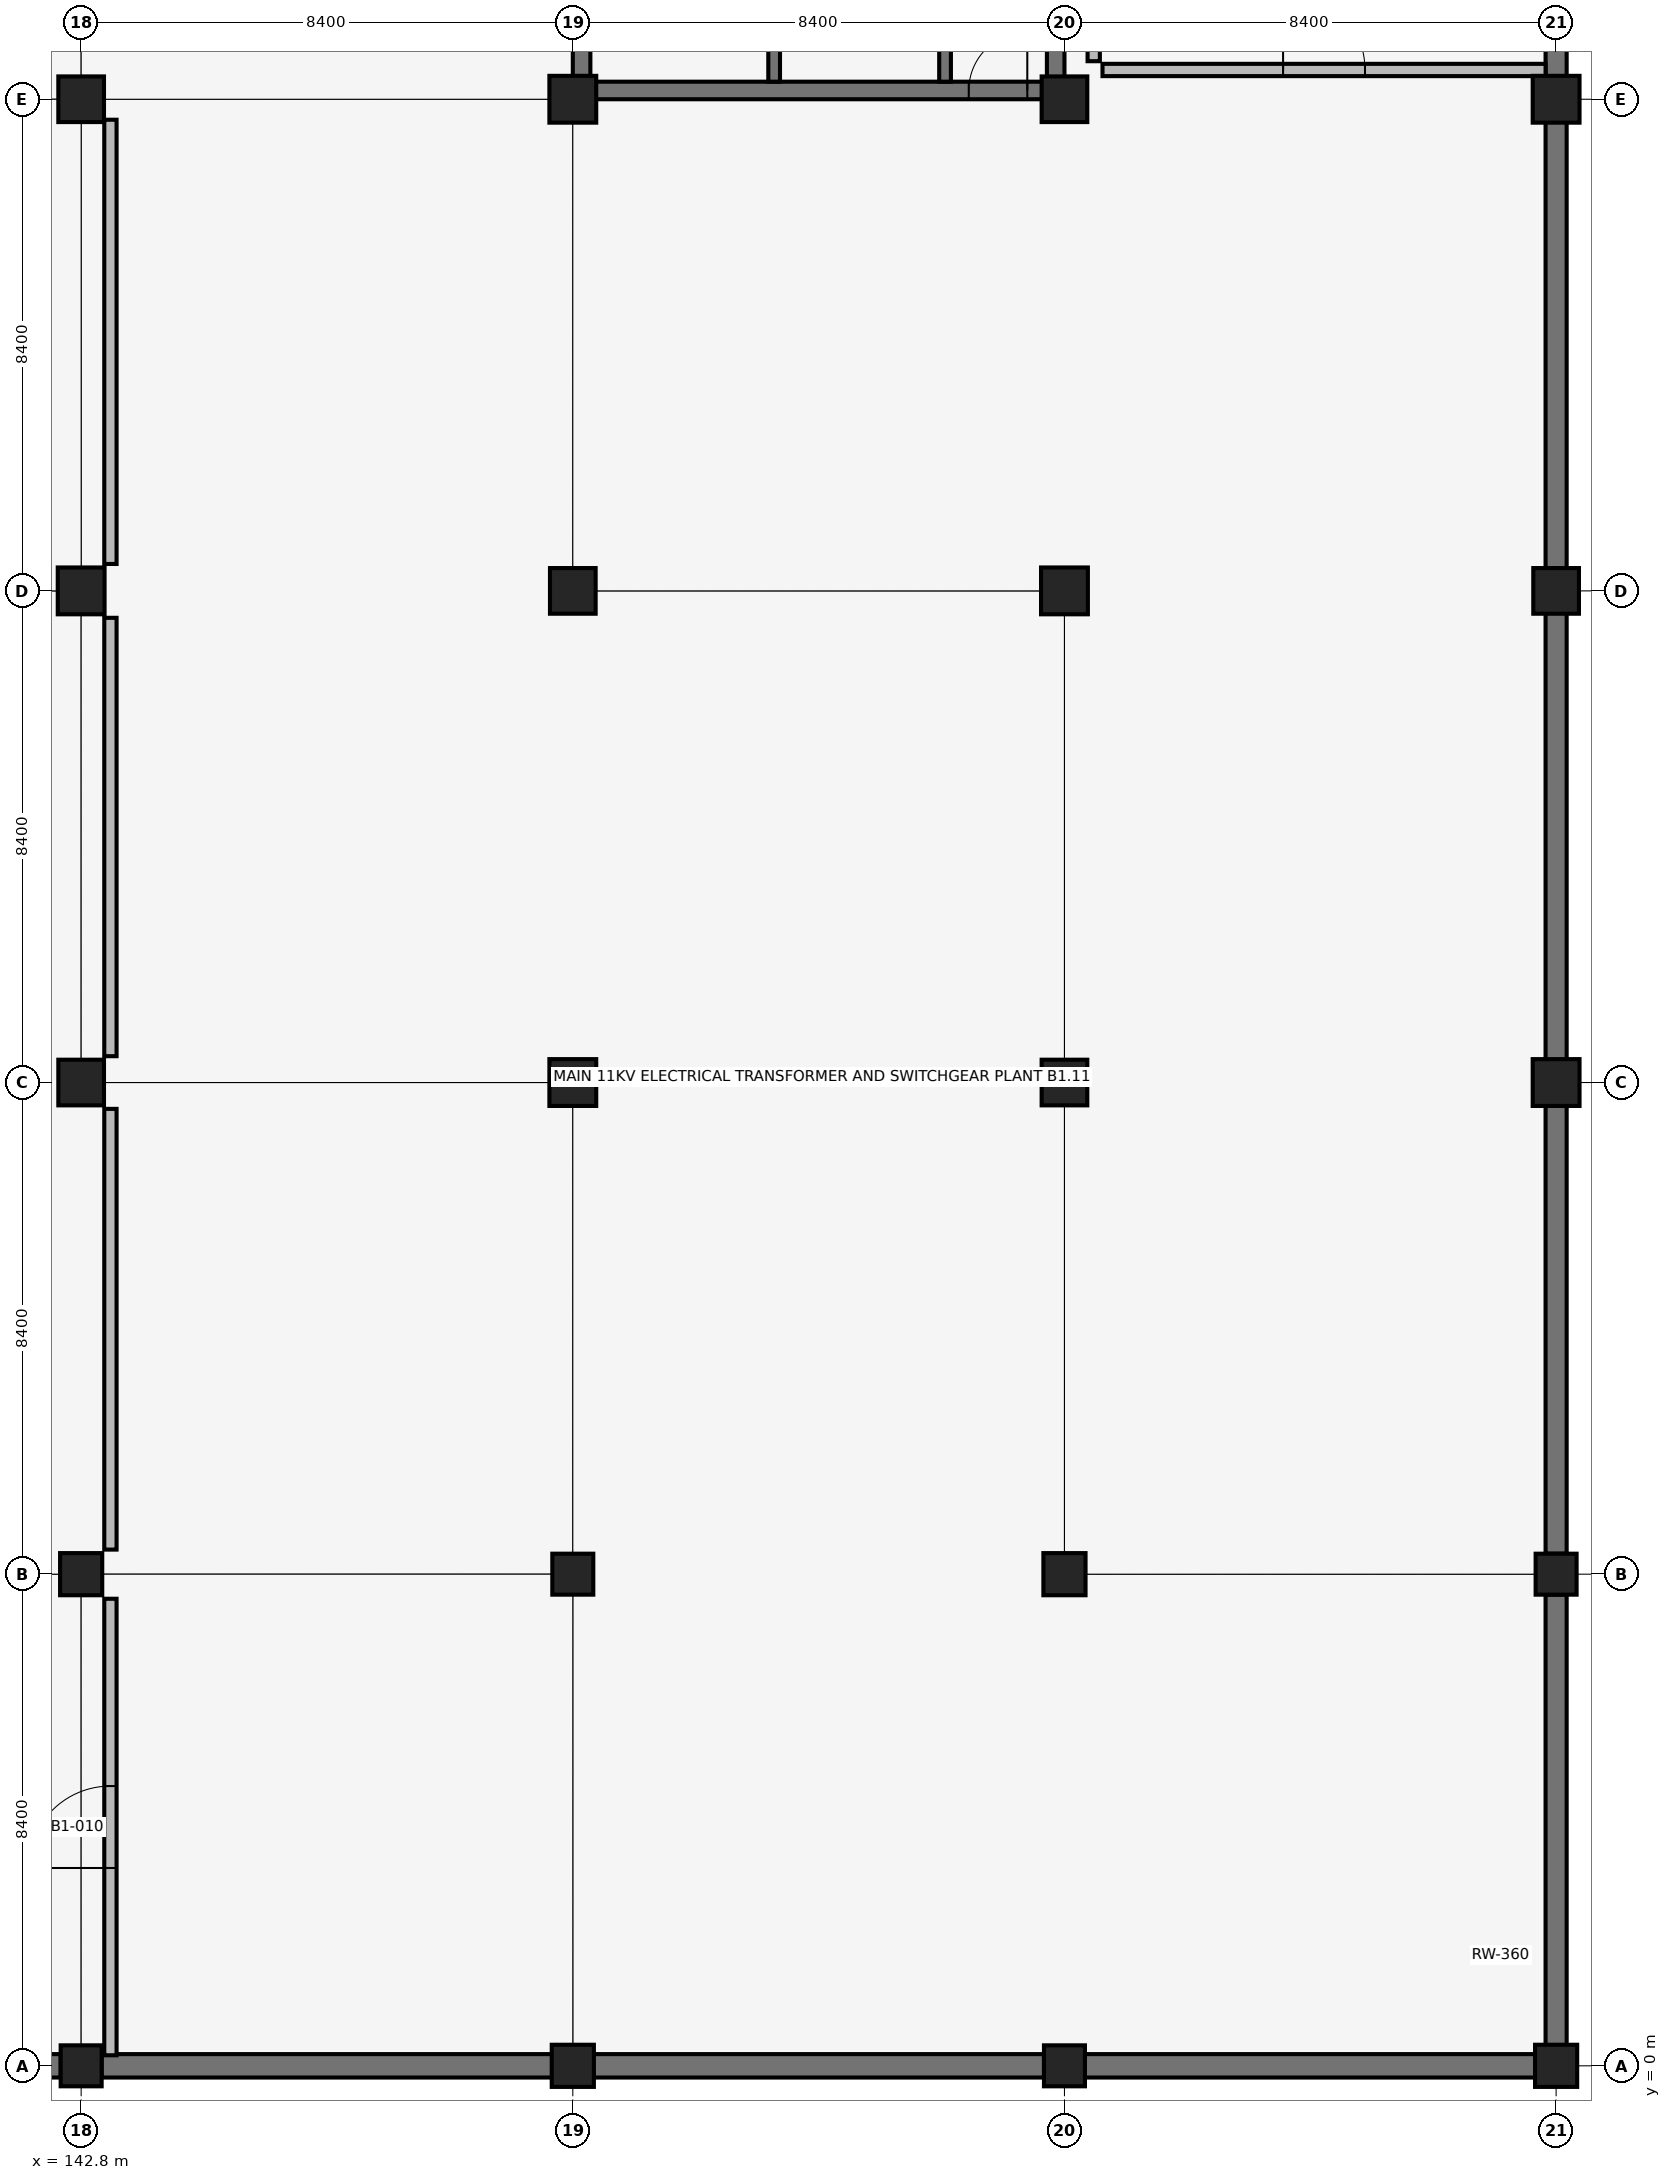
"""IFC4 building model, lengths in metres.
Left out: names, types, materials, properties, quantities, classifications, styles, units other than length and angle.
Written with IfcOpenShell. Run it as: python <this file> out.ifc"""

import sys

from ifc_helpers import new_model, si_unit, direction, frame, frame_2d, origin, origin_2d, place, context, subcontext, project, spatial, rectangle, extrude, element, fill, save


model = new_model("IFC4")
c1 = context("Model", 3, precision=1e-05, world=origin(), true_north=direction((0.0, 1.0)))
c2 = subcontext(c1, "Body", "Model", "MODEL_VIEW")
j1 = project(units=[si_unit("LENGTHUNIT", "METRE"), si_unit("PLANEANGLEUNIT", "RADIAN")], contexts=[c1])
p1 = place(None, origin())
s1 = spatial("IfcSite", under=j1, at=p1, CompositionType="ELEMENT")
p2 = place(p1, origin())
s2 = spatial("IfcBuilding", under=s1, at=p2, CompositionType="ELEMENT")
p3 = place(p2, frame((0.0, 0.0, -4.42)))
s3 = spatial("IfcBuildingStorey", under=s2, at=p3, CompositionType="ELEMENT", Elevation=-4.42)
p4 = place(p3, frame((134.75, 0.0, 0.0), z_axis=(0.0, 0.0, 1.0), x_axis=(1.0, 0.0, 0.0)))
e1 = element("IfcWall", 1, at=p4, inside=s3, PredefinedType="USERDEFINED", context=c2, shape_type="SweptSolid", body=[
    extrude(rectangle(XDim=7.7, YDim=0.4, at=frame_2d((3.85, 0.0))), origin(), (0.0, 0.0, 1.0), 4.12),
])
p5 = place(p3, frame((143.15, 0.0, 0.0), z_axis=(0.0, 0.0, 1.0), x_axis=(1.0, 0.0, 0.0)))
e2 = element("IfcWall", 2, at=p5, inside=s3, PredefinedType="USERDEFINED", context=c2, shape_type="SweptSolid", body=[
    extrude(rectangle(XDim=7.7, YDim=0.4, at=frame_2d((3.85, 0.0))), origin(), (0.0, 0.0, 1.0), 4.12),
])
for number, where, z_axis, x_axis in (
    (3, (151.55, 0.0, 0.0), (0.0, 0.0, 1.0), (1.0, 0.0, 0.0)),
    (4, (159.95, 0.0, 0.0), (0.0, 0.0, 1.0), (1.0, 0.0, 0.0)),
):
    element("IfcWall", number, at=place(p3, frame(where, z_axis=z_axis, x_axis=x_axis)), inside=s3, PredefinedType="USERDEFINED", context=c2, shape_type="SweptSolid", body=[
        extrude(rectangle(XDim=7.7, YDim=0.4, at=frame_2d((3.85, 0.0))), origin(), (0.0, 0.0, 1.0), 4.12),
    ])
for number, where, z_axis, x_axis in (
    (5, (168.0, 0.35, 0.0), (0.0, 0.0, 1.0), (0.0, 1.0, 0.0)),
    (6, (168.0, 8.75, 0.0), (0.0, 0.0, 1.0), (0.0, 1.0, 0.0)),
):
    element("IfcWall", number, at=place(p3, frame(where, z_axis=z_axis, x_axis=x_axis)), inside=s3, PredefinedType="USERDEFINED", context=c2, shape_type="SweptSolid", body=[
        extrude(rectangle(XDim=7.7, YDim=0.36, at=frame_2d((3.85, 0.0))), origin(), (0.0, 0.0, 1.0), 4.12),
    ])
p6 = place(p3, frame((168.0, 17.15, 0.0), z_axis=(0.0, 0.0, 1.0), x_axis=(0.0, 1.0, 0.0)))
e7 = element("IfcWall", 7, at=p6, inside=s3, PredefinedType="USERDEFINED", context=c2, shape_type="SweptSolid", body=[
    extrude(rectangle(XDim=7.7, YDim=0.36, at=frame_2d((3.85, 0.0))), origin(), (0.0, 0.0, 1.0), 4.12),
])
for number, where, z_axis, x_axis in (
    (8, (168.0, 25.55, 0.0), (0.0, 0.0, 1.0), (0.0, 1.0, 0.0)),
    (9, (168.0, 33.95, 0.0), (0.0, 0.0, 1.0), (0.0, 1.0, 0.0)),
):
    element("IfcWall", number, at=place(p3, frame(where, z_axis=z_axis, x_axis=x_axis)), inside=s3, PredefinedType="USERDEFINED", context=c2, shape_type="SweptSolid", body=[
        extrude(rectangle(XDim=7.7, YDim=0.36, at=frame_2d((3.85, 0.0))), origin(), (0.0, 0.0, 1.0), 4.12),
    ])
p7 = place(p3, frame((151.35, 33.75, 0.0), z_axis=(0.0, 0.0, 1.0), x_axis=(1.0, 0.0, 0.0)))
e10 = element("IfcWall", 10, at=p7, inside=s3, PredefinedType="SHEAR", context=c2, shape_type="SweptSolid", body=[
    extrude(rectangle(XDim=8.1, YDim=0.3, at=frame_2d((4.05, 0.0))), origin(), (0.0, 0.0, 1.0), 4.12),
])
p8 = place(p7, frame((6.615, 0.0, 0.0)))
e11 = element("IfcOpeningElement", 11, at=p8, cuts=e10, PredefinedType="OPENING", context=c2, shape_type="SweptSolid", body=[
    extrude(rectangle(XDim=1.0, YDim=2.15, at=frame_2d((0.5, 1.075))), frame((0.0, 0.16, 0.0), z_axis=(0.0, -1.0, 0.0), x_axis=(1.0, 0.0, 0.0)), (0.0, 0.0, 1.0), 0.32),
])
p9 = place(p3, frame((151.35, 33.75, 0.0), z_axis=(0.0, 0.0, 1.0), x_axis=(0.0, 1.0, 0.0)))
e12 = element("IfcWall", 12, at=p9, inside=s3, PredefinedType="SHEAR", context=c2, shape_type="SweptSolid", body=[
    extrude(rectangle(XDim=8.1, YDim=0.3, at=frame_2d((4.05, 0.0))), origin(), (0.0, 0.0, 1.0), 4.12),
])
p10 = place(p9, frame((1.325, 0.0, 0.0)))
e13 = element("IfcOpeningElement", 13, at=p10, cuts=e12, PredefinedType="OPENING", context=c2, shape_type="SweptSolid", body=[
    extrude(rectangle(XDim=1.45, YDim=2.15, at=frame_2d((0.725, 1.075))), frame((0.0, 0.16, 0.0), z_axis=(0.0, -1.0, 0.0), x_axis=(1.0, 0.0, 0.0)), (0.0, 0.0, 1.0), 0.32),
])
p11 = place(p3, frame((159.45, 33.75, 0.0), z_axis=(0.0, 0.0, 1.0), x_axis=(0.0, 1.0, 0.0)))
e14 = element("IfcWall", 14, at=p11, inside=s3, PredefinedType="SHEAR", context=c2, shape_type="SweptSolid", body=[
    extrude(rectangle(XDim=8.1, YDim=0.3, at=frame_2d((4.05, 0.0))), origin(), (0.0, 0.0, 1.0), 4.12),
])
p12 = place(p3, frame((142.8, 0.0, -0.4), z_axis=(0.0, 0.0, 1.0), x_axis=(1.0, 0.0, 0.0)))
e15 = element("IfcColumn", 15, at=p12, inside=s3, PredefinedType="COLUMN", context=c2, shape_type="SweptSolid", body=[
    extrude(rectangle(XDim=0.7, YDim=0.7, at=origin_2d()), origin(), (0.0, 0.0, 1.0), 4.52),
])
p13 = place(p3, frame((142.8, 8.4, -0.4), z_axis=(0.0, 0.0, 1.0), x_axis=(1.0, 0.0, 0.0)))
e16 = element("IfcColumn", 16, at=p13, inside=s3, PredefinedType="COLUMN", context=c2, shape_type="SweptSolid", body=[
    extrude(rectangle(XDim=0.72, YDim=0.72, at=origin_2d()), origin(), (0.0, 0.0, 1.0), 4.52),
])
p14 = place(p3, frame((142.8, 16.8, -0.4), z_axis=(0.0, 0.0, 1.0), x_axis=(1.0, 0.0, 0.0)))
e17 = element("IfcColumn", 17, at=p14, inside=s3, PredefinedType="COLUMN", context=c2, shape_type="SweptSolid", body=[
    extrude(rectangle(XDim=0.78, YDim=0.78, at=origin_2d()), origin(), (0.0, 0.0, 1.0), 4.52),
])
p15 = place(p3, frame((142.8, 25.2, -0.4), z_axis=(0.0, 0.0, 1.0), x_axis=(1.0, 0.0, 0.0)))
e18 = element("IfcColumn", 18, at=p15, inside=s3, PredefinedType="COLUMN", context=c2, shape_type="SweptSolid", body=[
    extrude(rectangle(XDim=0.8, YDim=0.8, at=origin_2d()), origin(), (0.0, 0.0, 1.0), 4.52),
])
p16 = place(p3, frame((142.8, 33.6, -0.4), z_axis=(0.0, 0.0, 1.0), x_axis=(1.0, 0.0, 0.0)))
e19 = element("IfcColumn", 19, at=p16, inside=s3, PredefinedType="COLUMN", context=c2, shape_type="SweptSolid", body=[
    extrude(rectangle(XDim=0.78, YDim=0.78, at=origin_2d()), origin(), (0.0, 0.0, 1.0), 4.52),
])
p17 = place(p3, frame((151.2, 0.0, -0.4), z_axis=(0.0, 0.0, 1.0), x_axis=(1.0, 0.0, 0.0)))
e20 = element("IfcColumn", 20, at=p17, inside=s3, PredefinedType="COLUMN", context=c2, shape_type="SweptSolid", body=[
    extrude(rectangle(XDim=0.72, YDim=0.72, at=origin_2d()), origin(), (0.0, 0.0, 1.0), 4.52),
])
p18 = place(p3, frame((151.2, 8.4, -0.4), z_axis=(0.0, 0.0, 1.0), x_axis=(1.0, 0.0, 0.0)))
e21 = element("IfcColumn", 21, at=p18, inside=s3, PredefinedType="COLUMN", context=c2, shape_type="SweptSolid", body=[
    extrude(rectangle(XDim=0.7, YDim=0.7, at=origin_2d()), origin(), (0.0, 0.0, 1.0), 4.52),
])
p19 = place(p3, frame((151.2, 16.8, -0.4), z_axis=(0.0, 0.0, 1.0), x_axis=(1.0, 0.0, 0.0)))
e22 = element("IfcColumn", 22, at=p19, inside=s3, PredefinedType="COLUMN", context=c2, shape_type="SweptSolid", body=[
    extrude(rectangle(XDim=0.8, YDim=0.8, at=origin_2d()), origin(), (0.0, 0.0, 1.0), 4.52),
])
p20 = place(p3, frame((151.2, 25.2, -0.4), z_axis=(0.0, 0.0, 1.0), x_axis=(1.0, 0.0, 0.0)))
e23 = element("IfcColumn", 23, at=p20, inside=s3, PredefinedType="COLUMN", context=c2, shape_type="SweptSolid", body=[
    extrude(rectangle(XDim=0.78, YDim=0.78, at=origin_2d()), origin(), (0.0, 0.0, 1.0), 4.52),
])
p21 = place(p3, frame((151.2, 33.6, -0.4), z_axis=(0.0, 0.0, 1.0), x_axis=(1.0, 0.0, 0.0)))
e24 = element("IfcColumn", 24, at=p21, inside=s3, PredefinedType="COLUMN", context=c2, shape_type="SweptSolid", body=[
    extrude(rectangle(XDim=0.8, YDim=0.8, at=origin_2d()), origin(), (0.0, 0.0, 1.0), 4.52),
])
p22 = place(p3, frame((159.6, 0.0, -0.4), z_axis=(0.0, 0.0, 1.0), x_axis=(1.0, 0.0, 0.0)))
e25 = element("IfcColumn", 25, at=p22, inside=s3, PredefinedType="COLUMN", context=c2, shape_type="SweptSolid", body=[
    extrude(rectangle(XDim=0.7, YDim=0.7, at=origin_2d()), origin(), (0.0, 0.0, 1.0), 4.52),
])
p23 = place(p3, frame((159.6, 8.4, -0.4), z_axis=(0.0, 0.0, 1.0), x_axis=(1.0, 0.0, 0.0)))
e26 = element("IfcColumn", 26, at=p23, inside=s3, PredefinedType="COLUMN", context=c2, shape_type="SweptSolid", body=[
    extrude(rectangle(XDim=0.72, YDim=0.72, at=origin_2d()), origin(), (0.0, 0.0, 1.0), 4.52),
])
p24 = place(p3, frame((159.6, 16.8, -0.4), z_axis=(0.0, 0.0, 1.0), x_axis=(1.0, 0.0, 0.0)))
e27 = element("IfcColumn", 27, at=p24, inside=s3, PredefinedType="COLUMN", context=c2, shape_type="SweptSolid", body=[
    extrude(rectangle(XDim=0.78, YDim=0.78, at=origin_2d()), origin(), (0.0, 0.0, 1.0), 4.52),
])
p25 = place(p3, frame((159.6, 25.2, -0.4), z_axis=(0.0, 0.0, 1.0), x_axis=(1.0, 0.0, 0.0)))
e28 = element("IfcColumn", 28, at=p25, inside=s3, PredefinedType="COLUMN", context=c2, shape_type="SweptSolid", body=[
    extrude(rectangle(XDim=0.8, YDim=0.8, at=origin_2d()), origin(), (0.0, 0.0, 1.0), 4.52),
])
p26 = place(p3, frame((159.6, 33.6, -0.4), z_axis=(0.0, 0.0, 1.0), x_axis=(1.0, 0.0, 0.0)))
e29 = element("IfcColumn", 29, at=p26, inside=s3, PredefinedType="COLUMN", context=c2, shape_type="SweptSolid", body=[
    extrude(rectangle(XDim=0.78, YDim=0.78, at=origin_2d()), origin(), (0.0, 0.0, 1.0), 4.52),
])
p27 = place(p3, frame((168.0, 0.0, -0.4), z_axis=(0.0, 0.0, 1.0), x_axis=(1.0, 0.0, 0.0)))
e30 = element("IfcColumn", 30, at=p27, inside=s3, PredefinedType="COLUMN", context=c2, shape_type="SweptSolid", body=[
    extrude(rectangle(XDim=0.72, YDim=0.72, at=origin_2d()), origin(), (0.0, 0.0, 1.0), 4.52),
])
p28 = place(p3, frame((168.0, 8.4, -0.4), z_axis=(0.0, 0.0, 1.0), x_axis=(1.0, 0.0, 0.0)))
e31 = element("IfcColumn", 31, at=p28, inside=s3, PredefinedType="COLUMN", context=c2, shape_type="SweptSolid", body=[
    extrude(rectangle(XDim=0.7, YDim=0.7, at=origin_2d()), origin(), (0.0, 0.0, 1.0), 4.52),
])
p29 = place(p3, frame((168.0, 16.8, -0.4), z_axis=(0.0, 0.0, 1.0), x_axis=(1.0, 0.0, 0.0)))
e32 = element("IfcColumn", 32, at=p29, inside=s3, PredefinedType="COLUMN", context=c2, shape_type="SweptSolid", body=[
    extrude(rectangle(XDim=0.8, YDim=0.8, at=origin_2d()), origin(), (0.0, 0.0, 1.0), 4.52),
])
p30 = place(p3, frame((168.0, 25.2, -0.4), z_axis=(0.0, 0.0, 1.0), x_axis=(1.0, 0.0, 0.0)))
e33 = element("IfcColumn", 33, at=p30, inside=s3, PredefinedType="COLUMN", context=c2, shape_type="SweptSolid", body=[
    extrude(rectangle(XDim=0.78, YDim=0.78, at=origin_2d()), origin(), (0.0, 0.0, 1.0), 4.52),
])
p31 = place(p3, frame((168.0, 33.6, -0.4), z_axis=(0.0, 0.0, 1.0), x_axis=(1.0, 0.0, 0.0)))
e34 = element("IfcColumn", 34, at=p31, inside=s3, PredefinedType="COLUMN", context=c2, shape_type="SweptSolid", body=[
    extrude(rectangle(XDim=0.8, YDim=0.8, at=origin_2d()), origin(), (0.0, 0.0, 1.0), 4.52),
])
p32 = place(p3, frame((154.64, 33.9, 0.0), z_axis=(0.0, 0.0, 1.0), x_axis=(0.0, 1.0, 0.0)))
e35 = element("IfcWall", 35, at=p32, inside=s3, PredefinedType="SHEAR", context=c2, shape_type="SweptSolid", body=[
    extrude(rectangle(XDim=3.8, YDim=0.2, at=frame_2d((1.9, 0.0))), origin(), (0.0, 0.0, 1.0), 3.17),
])
p33 = place(p32, frame((1.35, 0.0, 0.0)))
e36 = element("IfcOpeningElement", 36, at=p33, cuts=e35, PredefinedType="OPENING", context=c2, shape_type="SweptSolid", body=[
    extrude(rectangle(XDim=1.1, YDim=2.15, at=frame_2d((0.55, 1.075))), frame((0.0, 0.11, 0.0), z_axis=(0.0, -1.0, 0.0), x_axis=(1.0, 0.0, 0.0)), (0.0, 0.0, 1.0), 0.22),
])
p34 = place(p3, frame((157.56, 33.9, 0.0), z_axis=(0.0, 0.0, 1.0), x_axis=(0.0, 1.0, 0.0)))
e37 = element("IfcWall", 37, at=p34, inside=s3, PredefinedType="SHEAR", context=c2, shape_type="SweptSolid", body=[
    extrude(rectangle(XDim=3.8, YDim=0.2, at=frame_2d((1.9, 0.0))), origin(), (0.0, 0.0, 1.0), 3.17),
])
p35 = place(p3, frame((143.3, 0.18, 0.0), z_axis=(0.0, 0.0, 1.0), x_axis=(0.0, 1.0, 0.0)))
e38 = element("IfcWall", 38, at=p35, inside=s3, PredefinedType="PARTITIONING", context=c2, shape_type="SweptSolid", body=[
    extrude(rectangle(XDim=7.8, YDim=0.21, at=frame_2d((3.9, 0.0))), origin(), (0.0, 0.0, 1.0), 3.38),
])
p36 = place(p35, frame((3.2, 0.0, 0.0)))
e39 = element("IfcOpeningElement", 39, at=p36, cuts=e38, PredefinedType="OPENING", context=c2, shape_type="SweptSolid", body=[
    extrude(rectangle(XDim=1.4, YDim=2.2, at=frame_2d((0.7, 1.1))), frame((0.0, 0.115, 0.0), z_axis=(0.0, -1.0, 0.0), x_axis=(1.0, 0.0, 0.0)), (0.0, 0.0, 1.0), 0.23),
])
p37 = place(p3, frame((143.3, 8.82, 0.0), z_axis=(0.0, 0.0, 1.0), x_axis=(0.0, 1.0, 0.0)))
e40 = element("IfcWall", 40, at=p37, inside=s3, PredefinedType="PARTITIONING", context=c2, shape_type="SweptSolid", body=[
    extrude(rectangle(XDim=7.53, YDim=0.21, at=frame_2d((3.765, 0.0))), origin(), (0.0, 0.0, 1.0), 3.57),
])
p38 = place(p3, frame((143.3, 17.25, 0.0), z_axis=(0.0, 0.0, 1.0), x_axis=(0.0, 1.0, 0.0)))
e41 = element("IfcWall", 41, at=p38, inside=s3, PredefinedType="PARTITIONING", context=c2, shape_type="SweptSolid", body=[
    extrude(rectangle(XDim=7.49, YDim=0.21, at=frame_2d((3.745, 0.0))), origin(), (0.0, 0.0, 1.0), 3.56),
])
p39 = place(p3, frame((143.3, 25.66, 0.0), z_axis=(0.0, 0.0, 1.0), x_axis=(0.0, 1.0, 0.0)))
e42 = element("IfcWall", 42, at=p39, inside=s3, PredefinedType="PARTITIONING", context=c2, shape_type="SweptSolid", body=[
    extrude(rectangle(XDim=7.59, YDim=0.21, at=frame_2d((3.795, 0.0))), origin(), (0.0, 0.0, 1.0), 3.17),
])
p40 = place(p3, frame((160.25, 34.1, 0.0), z_axis=(0.0, 0.0, 1.0), x_axis=(1.0, 0.0, 0.0)))
e43 = element("IfcWall", 43, at=p40, inside=s3, PredefinedType="PARTITIONING", context=c2, shape_type="SweptSolid", body=[
    extrude(rectangle(XDim=7.57, YDim=0.21, at=frame_2d((3.785, 0.0))), origin(), (0.0, 0.0, 1.0), 3.37),
])
p41 = place(p40, frame((3.085, 0.0, 0.0)))
e44 = element("IfcOpeningElement", 44, at=p41, cuts=e43, PredefinedType="OPENING", context=c2, shape_type="SweptSolid", body=[
    extrude(rectangle(XDim=1.4, YDim=2.2, at=frame_2d((0.7, 1.1))), frame((0.0, 0.115, 0.0), z_axis=(0.0, -1.0, 0.0), x_axis=(1.0, 0.0, 0.0)), (0.0, 0.0, 1.0), 0.23),
])
p42 = place(p3, frame((160.1, 34.25, 0.0), z_axis=(0.0, 0.0, 1.0), x_axis=(0.0, 1.0, 0.0)))
e45 = element("IfcWall", 45, at=p42, inside=s3, PredefinedType="PARTITIONING", context=c2, shape_type="SweptSolid", body=[
    extrude(rectangle(XDim=7.29, YDim=0.21, at=frame_2d((3.645, 0.0))), origin(), (0.0, 0.0, 1.0), 3.56),
])
p43 = place(p8, origin())
e46 = element("IfcDoor", 46, at=p43, inside=s3, OperationType="SINGLE_SWING_RIGHT", PredefinedType="DOOR", context=c2, shape_type="SweptSolid", body=[
    extrude(rectangle(XDim=1.0, YDim=2.15, at=frame_2d((0.5, 1.075))), frame((0.0, 0.025, 0.0), z_axis=(0.0, -1.0, 0.0), x_axis=(1.0, 0.0, 0.0)), (0.0, 0.0, 1.0), 0.05),
])
fill(e11, e46)
p44 = place(p36, origin())
e47 = element("IfcDoor", 47, at=p44, inside=s3, OperationType="DOUBLE_DOOR_SINGLE_SWING", PredefinedType="DOOR", context=c2, shape_type="SweptSolid", body=[
    extrude(rectangle(XDim=1.4, YDim=2.2, at=frame_2d((0.7, 1.1))), frame((0.0, 0.025, 0.0), z_axis=(0.0, -1.0, 0.0), x_axis=(1.0, 0.0, 0.0)), (0.0, 0.0, 1.0), 0.05),
])
fill(e39, e47)
p45 = place(p41, origin())
e48 = element("IfcDoor", 48, at=p45, inside=s3, OperationType="DOUBLE_DOOR_SINGLE_SWING", PredefinedType="DOOR", context=c2, shape_type="SweptSolid", body=[
    extrude(rectangle(XDim=1.4, YDim=2.2, at=frame_2d((0.7, 1.1))), frame((0.0, 0.025, 0.0), z_axis=(0.0, -1.0, 0.0), x_axis=(1.0, 0.0, 0.0)), (0.0, 0.0, 1.0), 0.05),
])
fill(e44, e48)
save(model, sys.argv[1])
